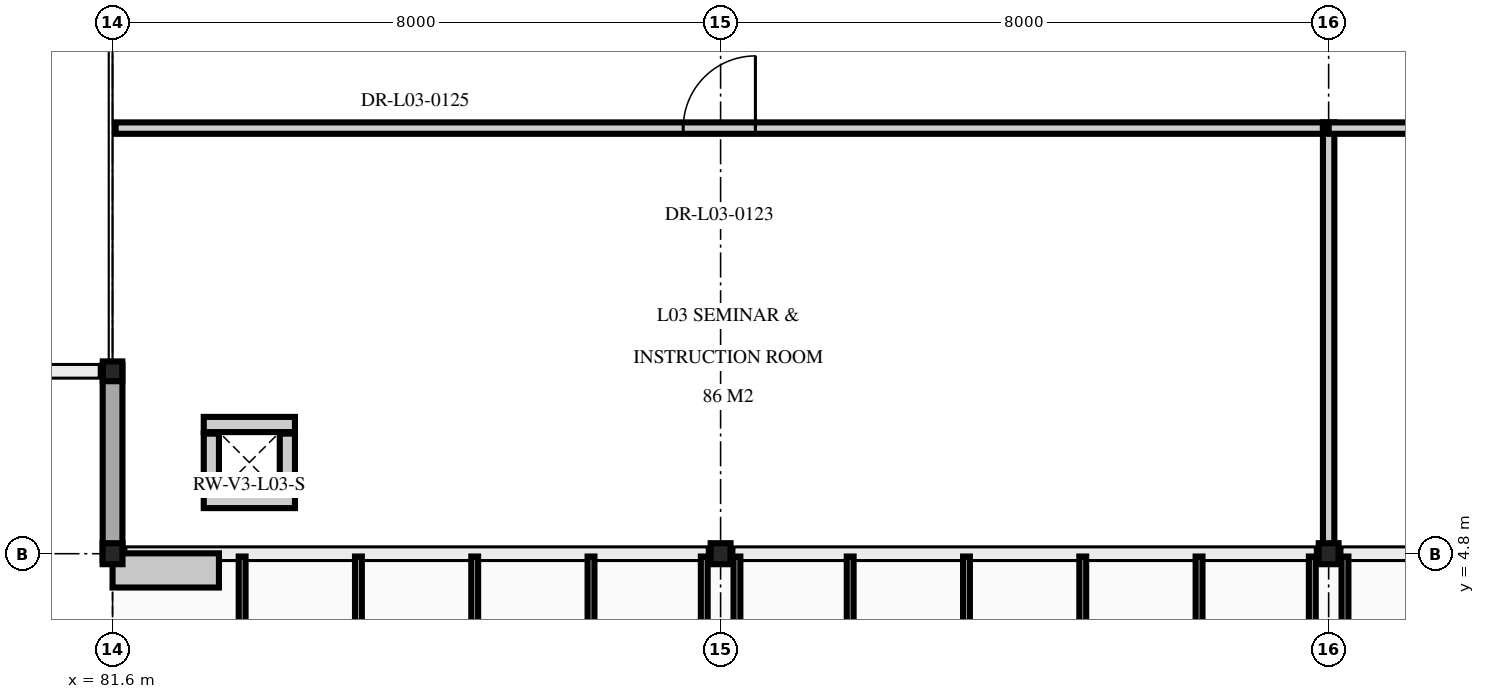
"""IFC4 building model, lengths in metres.
Left out: names, types, materials, properties, quantities, classifications, styles, units other than length and angle.
Written with IfcOpenShell. Run it as: python <this file> out.ifc"""

import sys

from ifc_helpers import new_model, si_unit, direction, frame, frame_2d, origin, origin_2d, place, context, subcontext, project, spatial, rectangle, i_section, extrude, element, fill, save


model = new_model("IFC4")
c1 = context("Model", 3, precision=1e-05, world=origin(), true_north=direction((0.0, 1.0)))
c2 = subcontext(c1, "Body", "Model", "MODEL_VIEW")
j1 = project(units=[si_unit("LENGTHUNIT", "METRE"), si_unit("PLANEANGLEUNIT", "RADIAN")], contexts=[c1])
p1 = place(None, origin())
s1 = spatial("IfcSite", under=j1, at=p1, CompositionType="ELEMENT")
p2 = place(p1, origin())
s2 = spatial("IfcBuilding", under=s1, at=p2, CompositionType="ELEMENT")
p3 = place(p2, frame((0.0, 0.0, 14.1)))
s3 = spatial("IfcBuildingStorey", under=s2, at=p3, CompositionType="ELEMENT", Elevation=14.1)
for number, where, z_axis, x_axis in (
    (1, (81.6, 4.8, 0.0), (0.0, 0.0, 1.0), (1.0, 0.0, 0.0)),
    (2, (89.6, 4.8, 0.0), (0.0, 0.0, 1.0), (1.0, 0.0, 0.0)),
    (3, (97.6, 4.8, 0.0), (0.0, 0.0, 1.0), (1.0, 0.0, 0.0)),
):
    element("IfcColumn", number, at=place(p3, frame(where, z_axis=z_axis, x_axis=x_axis)), inside=s3, PredefinedType="COLUMN", context=c2, shape_type="SweptSolid", body=[
        extrude(i_section(OverallWidth=0.261, OverallDepth=0.276, WebThickness=0.015, FlangeThickness=0.025, at=origin_2d()), origin(), (0.0, 0.0, 1.0), 4.5),
    ])
p4 = place(p3, frame((81.6, 7.2, 0.0), z_axis=(0.0, 0.0, 1.0), x_axis=(1.0, 0.0, 0.0)))
e4 = element("IfcColumn", 4, at=p4, inside=s3, PredefinedType="COLUMN", context=c2, shape_type="SweptSolid", body=[
    extrude(i_section(OverallWidth=0.256, OverallDepth=0.26, WebThickness=0.01, FlangeThickness=0.017, at=origin_2d()), origin(), (0.0, 0.0, 1.0), 4.5),
])
for number, where, z_axis, x_axis in (
    (5, (84.0, 5.5, 0.0), (0.0, 0.0, 1.0), (-1.0, 0.0, 0.0)),
    (6, (82.8, 6.5, 0.0), (0.0, 0.0, 1.0), (1.0, 0.0, 0.0)),
):
    element("IfcWall", number, at=place(p3, frame(where, z_axis=z_axis, x_axis=x_axis)), inside=s3, PredefinedType="PARTITIONING", context=c2, shape_type="SweptSolid", body=[
        extrude(rectangle(XDim=1.2, YDim=0.2, at=frame_2d((0.6, 0.0))), origin(), (0.0, 0.0, 1.0), 3.75),
    ])
for number, where, z_axis, x_axis in (
    (7, (82.9, 5.62, 0.0), (0.0, 0.0, 1.0), (0.0, 1.0, 0.0)),
    (8, (83.9, 6.38, 0.0), (0.0, 0.0, 1.0), (0.0, -1.0, 0.0)),
):
    element("IfcWall", number, at=place(p3, frame(where, z_axis=z_axis, x_axis=x_axis)), inside=s3, PredefinedType="PARTITIONING", context=c2, shape_type="SweptSolid", body=[
        extrude(rectangle(XDim=0.76, YDim=0.2, at=frame_2d((0.38, 0.0))), origin(), (0.0, 0.0, 1.0), 3.75),
    ])
p5 = place(p3, frame((81.6, 4.715, 0.0), z_axis=(0.0, 0.0, 1.0), x_axis=(0.0, 1.0, 0.0)))
e9 = element("IfcWall", 9, at=p5, inside=s3, PredefinedType="SOLIDWALL", context=c2, shape_type="SweptSolid", body=[
    extrude(rectangle(XDim=2.57, YDim=0.26, at=frame_2d((1.285, 0.0))), origin(), (0.0, 0.0, 1.0), 3.686),
])
p6 = place(p3, frame((81.64, 10.4, 0.0), z_axis=(0.0, 0.0, 1.0), x_axis=(1.0, 0.0, 0.0)))
e10 = element("IfcWall", 10, at=p6, inside=s3, PredefinedType="PARTITIONING", context=c2, shape_type="SweptSolid", body=[
    extrude(rectangle(XDim=15.885, YDim=0.15, at=frame_2d((7.942, 0.0))), origin(), (0.0, 0.0, 1.0), 3.675),
])
p7 = place(p6, frame((7.468, 0.0, 0.0)))
e11 = element("IfcOpeningElement", 11, at=p7, cuts=e10, PredefinedType="OPENING", context=c2, shape_type="SweptSolid", body=[
    extrude(rectangle(XDim=0.95, YDim=2.15, at=frame_2d((0.475, 1.075))), frame((0.0, 0.085, 0.0), z_axis=(0.0, -1.0, 0.0), x_axis=(1.0, 0.0, 0.0)), (0.0, 0.0, 1.0), 0.17),
])
p8 = place(p3, frame((97.6, 4.84, 0.0), z_axis=(0.0, 0.0, 1.0), x_axis=(0.0, 1.0, 0.0)))
e12 = element("IfcWall", 12, at=p8, inside=s3, PredefinedType="PARTITIONING", context=c2, shape_type="SweptSolid", body=[
    extrude(rectangle(XDim=5.635, YDim=0.15, at=frame_2d((2.817, 0.0))), origin(), (0.0, 0.0, 1.0), 3.686),
])
p9 = place(p3, frame((97.6, 10.4, 0.0), z_axis=(0.0, 0.0, 1.0), x_axis=(1.0, 0.0, 0.0)))
e13 = element("IfcWall", 13, at=p9, inside=s3, PredefinedType="PARTITIONING", context=c2, shape_type="SweptSolid", body=[
    extrude(rectangle(XDim=14.6, YDim=0.15, at=frame_2d((7.3, 0.0))), origin(), (0.0, 0.0, 1.0), 3.675),
])
p10 = place(p9, frame((6.85, 0.0, 0.0)))
e14 = element("IfcOpeningElement", 14, at=p10, cuts=e13, PredefinedType="OPENING", context=c2, shape_type="SweptSolid", body=[
    extrude(rectangle(XDim=0.9, YDim=2.15, at=frame_2d((0.45, 1.075))), frame((0.0, 0.085, 0.0), z_axis=(0.0, -1.0, 0.0), x_axis=(1.0, 0.0, 0.0)), (0.0, 0.0, 1.0), 0.17),
])
p11 = place(p7, origin())
e15 = element("IfcDoor", 15, at=p11, inside=s3, OperationType="SINGLE_SWING_RIGHT", PredefinedType="DOOR", context=c2, shape_type="SweptSolid", body=[
    extrude(rectangle(XDim=0.95, YDim=2.15, at=frame_2d((0.475, 1.075))), frame((0.0, 0.025, 0.0), z_axis=(0.0, -1.0, 0.0), x_axis=(1.0, 0.0, 0.0)), (0.0, 0.0, 1.0), 0.05),
])
fill(e11, e15)
save(model, sys.argv[1])
